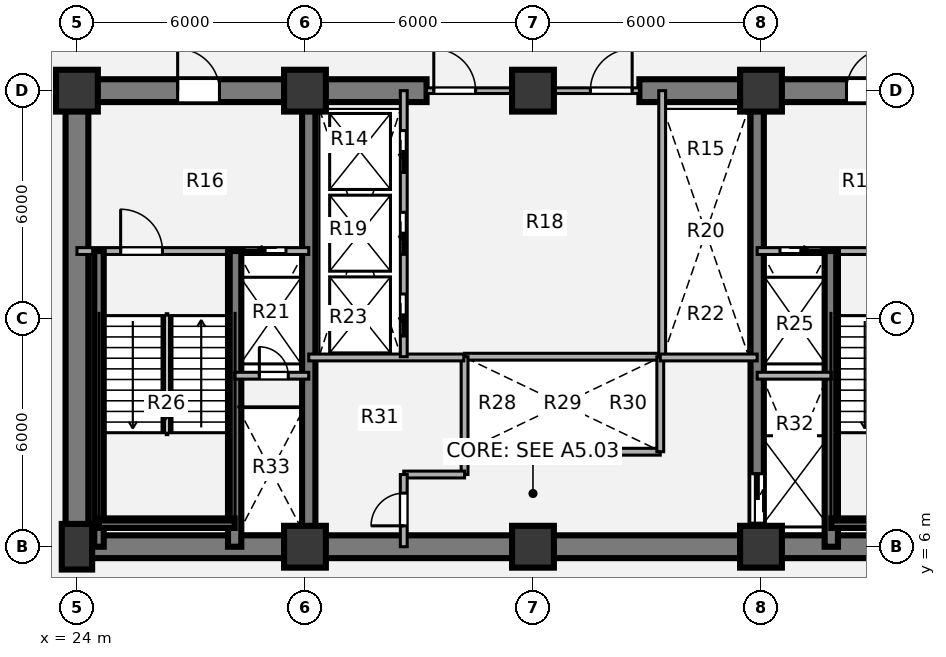
"""IFC4 building model, lengths in metres.
Left out: names, types, materials, properties, quantities, classifications, styles, units other than length and angle.
Written with IfcOpenShell. Run it as: python <this file> out.ifc"""

import sys

from ifc_helpers import new_model, si_unit, direction, frame, frame_2d, origin, origin_2d, place, context, subcontext, project, spatial, rectangle, extrude, source, transform, mapped, element, fill, save


model = new_model("IFC4")
c1 = context("Model", 3, precision=1e-05, world=origin(), true_north=direction((0.0, 1.0)))
c2 = subcontext(c1, "Body", "Model", "MODEL_VIEW")
j1 = project(units=[si_unit("LENGTHUNIT", "METRE"), si_unit("PLANEANGLEUNIT", "RADIAN")], contexts=[c1])
p1 = place(None, origin())
s1 = spatial("IfcSite", under=j1, at=p1, CompositionType="ELEMENT")
p2 = place(p1, origin())
s2 = spatial("IfcBuilding", under=s1, at=p2, CompositionType="ELEMENT")
p3 = place(p2, frame((0.0, 0.0, 5.4)))
s3 = spatial("IfcBuildingStorey", under=s2, at=p3, CompositionType="ELEMENT", Elevation=5.4)
m1 = source(origin(), c2, "Body", "SweptSolid", [
    extrude(rectangle(XDim=0.8, YDim=1.2, at=origin_2d()), origin(), (0.0, 0.0, 1.0), 4.32),
])
p4 = place(p3, frame((24.0, 6.0, 0.0), z_axis=(0.0, 0.0, 1.0), x_axis=(1.0, 0.0, 0.0)))
e1 = element("IfcColumn", 1, at=p4, inside=s3, PredefinedType="COLUMN", context=c2, shape_type="MappedRepresentation", body=[
    mapped(m1, transform((0.0, 0.0, 0.0), x_axis=(1.0, 0.0, 0.0), y_axis=(0.0, 1.0, 0.0), z_axis=(0.0, 0.0, 1.0), scale=1.0)),
])
m2 = source(origin(), c2, "Body", "SweptSolid", [
    extrude(rectangle(XDim=1.1, YDim=1.1, at=origin_2d()), origin(), (0.0, 0.0, 1.0), 4.32),
])
for number, where, z_axis, x_axis in (
    (2, (30.0, 6.0, 0.0), (0.0, 0.0, 1.0), (1.0, 0.0, 0.0)),
    (3, (36.0, 6.0, 0.0), (0.0, 0.0, 1.0), (1.0, 0.0, 0.0)),
    (4, (42.0, 6.0, 0.0), (0.0, 0.0, 1.0), (1.0, 0.0, 0.0)),
    (5, (24.0, 18.0, 0.0), (0.0, 0.0, 1.0), (1.0, 0.0, 0.0)),
    (6, (30.0, 18.0, 0.0), (0.0, 0.0, 1.0), (1.0, 0.0, 0.0)),
    (7, (36.0, 18.0, 0.0), (0.0, 0.0, 1.0), (1.0, 0.0, 0.0)),
    (8, (42.0, 18.0, 0.0), (0.0, 0.0, 1.0), (1.0, 0.0, 0.0)),
):
    element("IfcColumn", number, at=place(p3, frame(where, z_axis=z_axis, x_axis=x_axis)), inside=s3, PredefinedType="COLUMN", context=c2, shape_type="MappedRepresentation", body=[
        mapped(m2, transform((0.0, 0.0, 0.0), x_axis=(1.0, 0.0, 0.0), y_axis=(0.0, 1.0, 0.0), z_axis=(0.0, 0.0, 1.0), scale=1.0)),
    ])
p5 = place(p3, frame((48.3, 6.0, 0.0), z_axis=(0.0, 0.0, 1.0), x_axis=(-1.0, 0.0, 0.0)))
e9 = element("IfcWall", 9, at=p5, inside=s3, PredefinedType="SHEAR", context=c2, shape_type="SweptSolid", body=[
    extrude(rectangle(XDim=24.6, YDim=0.6, at=frame_2d((12.3, 0.0))), origin(), (0.0, 0.0, 1.0), 4.32),
])
p6 = place(p3, frame((24.0, 6.0, 0.0), z_axis=(0.0, 0.0, 1.0), x_axis=(0.0, 1.0, 0.0)))
e10 = element("IfcWall", 10, at=p6, inside=s3, PredefinedType="SHEAR", context=c2, shape_type="SweptSolid", body=[
    extrude(rectangle(XDim=12.0, YDim=0.6, at=frame_2d((6.0, 0.0))), origin(), (0.0, 0.0, 1.0), 4.32),
])
p7 = place(p3, frame((23.7, 18.0, 0.0), z_axis=(0.0, 0.0, 1.0), x_axis=(1.0, 0.0, 0.0)))
e11 = element("IfcWall", 11, at=p7, inside=s3, PredefinedType="SHEAR", context=c2, shape_type="SweptSolid", body=[
    extrude(rectangle(XDim=9.5, YDim=0.6, at=frame_2d((4.75, 0.0))), origin(), (0.0, 0.0, 1.0), 4.32),
])
p8 = place(p7, frame((2.95, 0.0, 0.0)))
e12 = element("IfcOpeningElement", 12, at=p8, cuts=e11, PredefinedType="OPENING", context=c2, shape_type="SweptSolid", body=[
    extrude(rectangle(XDim=1.1, YDim=2.1, at=origin_2d()), frame((0.55, 0.31, 1.05), z_axis=(0.0, -1.0, 0.0), x_axis=(1.0, 0.0, 0.0)), (0.0, 0.0, 1.0), 0.62),
])
p9 = place(p3, frame((38.8, 18.0, 0.0), z_axis=(0.0, 0.0, 1.0), x_axis=(1.0, 0.0, 0.0)))
e13 = element("IfcWall", 13, at=p9, inside=s3, PredefinedType="SHEAR", context=c2, shape_type="SweptSolid", body=[
    extrude(rectangle(XDim=9.5, YDim=0.6, at=frame_2d((4.75, 0.0))), origin(), (0.0, 0.0, 1.0), 4.32),
])
p10 = place(p9, frame((5.45, 0.0, 0.0)))
e14 = element("IfcOpeningElement", 14, at=p10, cuts=e13, PredefinedType="OPENING", context=c2, shape_type="SweptSolid", body=[
    extrude(rectangle(XDim=1.1, YDim=2.1, at=origin_2d()), frame((0.55, 0.31, 1.05), z_axis=(0.0, -1.0, 0.0), x_axis=(1.0, 0.0, 0.0)), (0.0, 0.0, 1.0), 0.62),
])
p11 = place(p3, frame((30.1, 6.0, 0.0), z_axis=(0.0, 0.0, 1.0), x_axis=(0.0, 1.0, 0.0)))
e15 = element("IfcWall", 15, at=p11, inside=s3, PredefinedType="SHEAR", context=c2, shape_type="SweptSolid", body=[
    extrude(rectangle(XDim=12.0, YDim=0.35, at=frame_2d((6.0, 0.0))), origin(), (0.0, 0.0, 1.0), 4.32),
])
p12 = place(p3, frame((41.9, 18.0, 0.0), z_axis=(0.0, 0.0, 1.0), x_axis=(0.0, -1.0, 0.0)))
e16 = element("IfcWall", 16, at=p12, inside=s3, PredefinedType="SHEAR", context=c2, shape_type="SweptSolid", body=[
    extrude(rectangle(XDim=12.0, YDim=0.35, at=frame_2d((6.0, 0.0))), origin(), (0.0, 0.0, 1.0), 4.32),
])
p13 = place(p12, frame((10.08, 0.0, 0.0)))
e17 = element("IfcOpeningElement", 17, at=p13, cuts=e16, PredefinedType="OPENING", context=c2, shape_type="SweptSolid", body=[
    extrude(rectangle(XDim=1.3, YDim=2.1, at=origin_2d()), frame((0.65, 0.185, 1.05), z_axis=(0.0, -1.0, 0.0), x_axis=(1.0, 0.0, 0.0)), (0.0, 0.0, 1.0), 0.37),
])
for number, where, z_axis, x_axis in (
    (18, (34.2, 11.0, 0.0), (0.0, 0.0, 1.0), (1.0, 0.0, 0.0)),
    (19, (34.2, 8.5, 0.0), (0.0, 0.0, 1.0), (1.0, 0.0, 0.0)),
):
    element("IfcWall", number, at=place(p3, frame(where, z_axis=z_axis, x_axis=x_axis)), inside=s3, PredefinedType="PARTITIONING", context=c2, shape_type="SweptSolid", body=[
        extrude(rectangle(XDim=5.15, YDim=0.18, at=frame_2d((2.575, 0.0))), origin(), (0.0, 0.0, 1.0), 4.01),
    ])
for number, where, z_axis, x_axis in (
    (20, (34.2, 8.5, 0.0), (0.0, 0.0, 1.0), (0.0, 1.0, 0.0)),
    (21, (39.35, 8.5, 0.0), (0.0, 0.0, 1.0), (0.0, 1.0, 0.0)),
):
    element("IfcWall", number, at=place(p3, frame(where, z_axis=z_axis, x_axis=x_axis)), inside=s3, PredefinedType="PARTITIONING", context=c2, shape_type="SweptSolid", body=[
        extrude(rectangle(XDim=2.5, YDim=0.18, at=frame_2d((1.25, 0.0))), origin(), (0.0, 0.0, 1.0), 4.01),
    ])
p14 = place(p3, frame((39.4, 11.0, 0.0), z_axis=(0.0, 0.0, 1.0), x_axis=(0.0, 1.0, 0.0)))
e22 = element("IfcWall", 22, at=p14, inside=s3, PredefinedType="PARTITIONING", context=c2, shape_type="SweptSolid", body=[
    extrude(rectangle(XDim=7.0, YDim=0.18, at=frame_2d((3.5, 0.0))), origin(), (0.0, 0.0, 1.0), 4.01),
])
p15 = place(p3, frame((30.1, 10.98, 0.0), z_axis=(0.0, 0.0, 1.0), x_axis=(1.0, 0.0, 0.0)))
e23 = element("IfcWall", 23, at=p15, inside=s3, PredefinedType="PARTITIONING", context=c2, shape_type="SweptSolid", body=[
    extrude(rectangle(XDim=4.08, YDim=0.18, at=frame_2d((2.04, 0.0))), origin(), (0.0, 0.0, 1.0), 4.01),
])
p16 = place(p3, frame((34.2, 7.9, 0.0), z_axis=(0.0, 0.0, 1.0), x_axis=(0.0, 1.0, 0.0)))
e24 = element("IfcWall", 24, at=p16, inside=s3, PredefinedType="PARTITIONING", context=c2, shape_type="SweptSolid", body=[
    extrude(rectangle(XDim=0.6, YDim=0.18, at=frame_2d((0.3, 0.0))), origin(), (0.0, 0.0, 1.0), 4.01),
])
p17 = place(p3, frame((32.6, 7.9, 0.0), z_axis=(0.0, 0.0, 1.0), x_axis=(1.0, 0.0, 0.0)))
e25 = element("IfcWall", 25, at=p17, inside=s3, PredefinedType="PARTITIONING", context=c2, shape_type="SweptSolid", body=[
    extrude(rectangle(XDim=1.6, YDim=0.18, at=frame_2d((0.8, 0.0))), origin(), (0.0, 0.0, 1.0), 4.01),
])
p18 = place(p3, frame((32.6, 6.0, 0.0), z_axis=(0.0, 0.0, 1.0), x_axis=(0.0, 1.0, 0.0)))
e26 = element("IfcWall", 26, at=p18, inside=s3, PredefinedType="PARTITIONING", context=c2, shape_type="SweptSolid", body=[
    extrude(rectangle(XDim=1.9, YDim=0.18, at=frame_2d((0.95, 0.0))), origin(), (0.0, 0.0, 1.0), 4.01),
])
p19 = place(p18, frame((0.55, 0.0, 0.0)))
e27 = element("IfcOpeningElement", 27, at=p19, cuts=e26, PredefinedType="OPENING", context=c2, shape_type="SweptSolid", body=[
    extrude(rectangle(XDim=0.86, YDim=2.1, at=origin_2d()), frame((0.43, 0.1, 1.05), z_axis=(0.0, -1.0, 0.0), x_axis=(1.0, 0.0, 0.0)), (0.0, 0.0, 1.0), 0.2),
])
p20 = place(p3, frame((39.35, 10.98, 0.0), z_axis=(0.0, 0.0, 1.0), x_axis=(1.0, 0.0, 0.0)))
e28 = element("IfcWall", 28, at=p20, inside=s3, PredefinedType="PARTITIONING", context=c2, shape_type="SweptSolid", body=[
    extrude(rectangle(XDim=2.55, YDim=0.18, at=frame_2d((1.275, 0.0))), origin(), (0.0, 0.0, 1.0), 4.01),
])
p21 = place(p3, frame((33.2, 18.0, 0.0), z_axis=(0.0, 0.0, 1.0), x_axis=(1.0, 0.0, 0.0)))
e29 = element("IfcWall", 29, at=p21, inside=s3, PredefinedType="PARTITIONING", context=c2, shape_type="SweptSolid", body=[
    extrude(rectangle(XDim=5.6, YDim=0.15, at=frame_2d((2.8, 0.0))), origin(), (0.0, 0.0, 1.0), 2.825),
])
p22 = place(p21, frame((0.19, 0.0, 0.0)))
e30 = element("IfcOpeningElement", 30, at=p22, cuts=e29, PredefinedType="OPENING", context=c2, shape_type="SweptSolid", body=[
    extrude(rectangle(XDim=1.1, YDim=2.1, at=origin_2d()), frame((0.55, 0.085, 1.05), z_axis=(0.0, -1.0, 0.0), x_axis=(1.0, 0.0, 0.0)), (0.0, 0.0, 1.0), 0.17),
])
p23 = place(p21, frame((4.31, 0.0, 0.0)))
e31 = element("IfcOpeningElement", 31, at=p23, cuts=e29, PredefinedType="OPENING", context=c2, shape_type="SweptSolid", body=[
    extrude(rectangle(XDim=1.1, YDim=2.1, at=origin_2d()), frame((0.55, 0.085, 1.05), z_axis=(0.0, -1.0, 0.0), x_axis=(1.0, 0.0, 0.0)), (0.0, 0.0, 1.0), 0.17),
])
p24 = place(p3, frame((24.0, 13.78, 0.0), z_axis=(0.0, 0.0, 1.0), x_axis=(1.0, 0.0, 0.0)))
e32 = element("IfcWall", 32, at=p24, inside=s3, PredefinedType="PARTITIONING", context=c2, shape_type="SweptSolid", body=[
    extrude(rectangle(XDim=6.1, YDim=0.18, at=frame_2d((3.05, 0.0))), origin(), (0.0, 0.0, 1.0), 4.01),
])
p25 = place(p24, frame((1.15, 0.0, 0.0)))
e33 = element("IfcOpeningElement", 33, at=p25, cuts=e32, PredefinedType="OPENING", context=c2, shape_type="SweptSolid", body=[
    extrude(rectangle(XDim=1.1, YDim=2.1, at=origin_2d()), frame((0.55, 0.1, 1.05), z_axis=(0.0, -1.0, 0.0), x_axis=(1.0, 0.0, 0.0)), (0.0, 0.0, 1.0), 0.2),
])
p26 = place(p24, frame((4.4, 0.0, 0.0)))
e34 = element("IfcOpeningElement", 34, at=p26, cuts=e32, PredefinedType="OPENING", context=c2, shape_type="SweptSolid", body=[
    extrude(rectangle(XDim=1.1, YDim=2.1, at=origin_2d()), frame((0.55, 0.1, 1.05), z_axis=(0.0, -1.0, 0.0), x_axis=(1.0, 0.0, 0.0)), (0.0, 0.0, 1.0), 0.2),
])
p27 = place(p3, frame((28.15, 6.0, 0.0), z_axis=(0.0, 0.0, 1.0), x_axis=(0.0, 1.0, 0.0)))
e35 = element("IfcWall", 35, at=p27, inside=s3, PredefinedType="SHEAR", context=c2, shape_type="SweptSolid", body=[
    extrude(rectangle(XDim=7.78, YDim=0.35, at=frame_2d((3.89, 0.0))), origin(), (0.0, 0.0, 1.0), 4.36),
])
p28 = place(p3, frame((24.58, 6.0, 0.0), z_axis=(0.0, 0.0, 1.0), x_axis=(0.0, 1.0, 0.0)))
e36 = element("IfcWall", 36, at=p28, inside=s3, PredefinedType="SHEAR", context=c2, shape_type="SweptSolid", body=[
    extrude(rectangle(XDim=7.78, YDim=0.25, at=frame_2d((3.89, 0.0))), origin(), (0.0, 0.0, 1.0), 4.36),
])
p29 = place(p3, frame((24.58, 6.62, 0.0), z_axis=(0.0, 0.0, 1.0), x_axis=(1.0, 0.0, 0.0)))
e37 = element("IfcWall", 37, at=p29, inside=s3, PredefinedType="SHEAR", context=c2, shape_type="SweptSolid", body=[
    extrude(rectangle(XDim=3.57, YDim=0.25, at=frame_2d((1.785, 0.0))), origin(), (0.0, 0.0, 1.0), 4.36),
])
p30 = place(p3, frame((28.15, 10.5, 0.0), z_axis=(0.0, 0.0, 1.0), x_axis=(1.0, 0.0, 0.0)))
e38 = element("IfcWall", 38, at=p30, inside=s3, PredefinedType="PARTITIONING", context=c2, shape_type="SweptSolid", body=[
    extrude(rectangle(XDim=1.95, YDim=0.18, at=frame_2d((0.975, 0.0))), origin(), (0.0, 0.0, 1.0), 4.01),
])
p31 = place(p30, frame((0.65, 0.0, 0.0)))
e39 = element("IfcOpeningElement", 39, at=p31, cuts=e38, PredefinedType="OPENING", context=c2, shape_type="SweptSolid", body=[
    extrude(rectangle(XDim=0.76, YDim=2.05, at=origin_2d()), frame((0.38, 0.1, 1.025), z_axis=(0.0, -1.0, 0.0), x_axis=(1.0, 0.0, 0.0)), (0.0, 0.0, 1.0), 0.2),
])
p32 = place(p3, frame((41.9, 13.78, 0.0), z_axis=(0.0, 0.0, 1.0), x_axis=(1.0, 0.0, 0.0)))
e40 = element("IfcWall", 40, at=p32, inside=s3, PredefinedType="PARTITIONING", context=c2, shape_type="SweptSolid", body=[
    extrude(rectangle(XDim=6.1, YDim=0.18, at=frame_2d((3.05, 0.0))), origin(), (0.0, 0.0, 1.0), 4.01),
])
p33 = place(p32, frame((0.6, 0.0, 0.0)))
e41 = element("IfcOpeningElement", 41, at=p33, cuts=e40, PredefinedType="OPENING", context=c2, shape_type="SweptSolid", body=[
    extrude(rectangle(XDim=1.1, YDim=2.1, at=origin_2d()), frame((0.55, 0.1, 1.05), z_axis=(0.0, -1.0, 0.0), x_axis=(1.0, 0.0, 0.0)), (0.0, 0.0, 1.0), 0.2),
])
p34 = place(p32, frame((3.8, 0.0, 0.0)))
e42 = element("IfcOpeningElement", 42, at=p34, cuts=e40, PredefinedType="OPENING", context=c2, shape_type="SweptSolid", body=[
    extrude(rectangle(XDim=1.1, YDim=2.1, at=origin_2d()), frame((0.55, 0.1, 1.05), z_axis=(0.0, -1.0, 0.0), x_axis=(1.0, 0.0, 0.0)), (0.0, 0.0, 1.0), 0.2),
])
p35 = place(p3, frame((43.85, 6.0, 0.0), z_axis=(0.0, 0.0, 1.0), x_axis=(0.0, 1.0, 0.0)))
e43 = element("IfcWall", 43, at=p35, inside=s3, PredefinedType="SHEAR", context=c2, shape_type="SweptSolid", body=[
    extrude(rectangle(XDim=7.78, YDim=0.35, at=frame_2d((3.89, 0.0))), origin(), (0.0, 0.0, 1.0), 4.36),
])
p36 = place(p3, frame((43.85, 6.62, 0.0), z_axis=(0.0, 0.0, 1.0), x_axis=(1.0, 0.0, 0.0)))
e44 = element("IfcWall", 44, at=p36, inside=s3, PredefinedType="SHEAR", context=c2, shape_type="SweptSolid", body=[
    extrude(rectangle(XDim=3.57, YDim=0.25, at=frame_2d((1.785, 0.0))), origin(), (0.0, 0.0, 1.0), 4.36),
])
p37 = place(p3, frame((41.9, 10.5, 0.0), z_axis=(0.0, 0.0, 1.0), x_axis=(1.0, 0.0, 0.0)))
e45 = element("IfcWall", 45, at=p37, inside=s3, PredefinedType="PARTITIONING", context=c2, shape_type="SweptSolid", body=[
    extrude(rectangle(XDim=1.95, YDim=0.18, at=frame_2d((0.975, 0.0))), origin(), (0.0, 0.0, 1.0), 4.01),
])
p38 = place(p3, frame((32.6, 11.0, 0.0), z_axis=(0.0, 0.0, 1.0), x_axis=(0.0, 1.0, 0.0)))
e46 = element("IfcWall", 46, at=p38, inside=s3, PredefinedType="PARTITIONING", context=c2, shape_type="SweptSolid", body=[
    extrude(rectangle(XDim=7.0, YDim=0.18, at=frame_2d((3.5, 0.0))), origin(), (0.0, 0.0, 1.0), 4.01),
])
p39 = place(p38, frame((0.55, 0.0, 0.0)))
e47 = element("IfcOpeningElement", 47, at=p39, cuts=e46, PredefinedType="OPENING", context=c2, shape_type="SweptSolid", body=[
    extrude(rectangle(XDim=1.1, YDim=2.1, at=origin_2d()), frame((0.55, 0.1, 1.05), z_axis=(0.0, -1.0, 0.0), x_axis=(1.0, 0.0, 0.0)), (0.0, 0.0, 1.0), 0.2),
])
p40 = place(p38, frame((2.7, 0.0, 0.0)))
e48 = element("IfcOpeningElement", 48, at=p40, cuts=e46, PredefinedType="OPENING", context=c2, shape_type="SweptSolid", body=[
    extrude(rectangle(XDim=1.1, YDim=2.1, at=origin_2d()), frame((0.55, 0.1, 1.05), z_axis=(0.0, -1.0, 0.0), x_axis=(1.0, 0.0, 0.0)), (0.0, 0.0, 1.0), 0.2),
])
p41 = place(p38, frame((4.85, 0.0, 0.0)))
e49 = element("IfcOpeningElement", 49, at=p41, cuts=e46, PredefinedType="OPENING", context=c2, shape_type="SweptSolid", body=[
    extrude(rectangle(XDim=1.1, YDim=2.1, at=origin_2d()), frame((0.55, 0.1, 1.05), z_axis=(0.0, -1.0, 0.0), x_axis=(1.0, 0.0, 0.0)), (0.0, 0.0, 1.0), 0.2),
])
m3 = source(origin(), c2, "Body", "SweptSolid", [
    extrude(rectangle(XDim=0.86, YDim=2.1, at=origin_2d()), frame((0.43, 0.025, 1.05), z_axis=(0.0, -1.0, 0.0), x_axis=(1.0, 0.0, 0.0)), (0.0, 0.0, 1.0), 0.05),
])
p42 = place(p19, origin())
e50 = element("IfcDoor", 50, at=p42, inside=s3, OperationType="SINGLE_SWING_LEFT", PredefinedType="DOOR", context=c2, shape_type="MappedRepresentation", body=[
    mapped(m3, transform((0.0, 0.0, 0.0), x_axis=(1.0, 0.0, 0.0), y_axis=(0.0, 1.0, 0.0), z_axis=(0.0, 0.0, 1.0), scale=1.0)),
])
fill(e27, e50)
m4 = source(origin(), c2, "Body", "SweptSolid", [
    extrude(rectangle(XDim=1.1, YDim=2.1, at=origin_2d()), frame((0.55, 0.025, 1.05), z_axis=(0.0, -1.0, 0.0), x_axis=(1.0, 0.0, 0.0)), (0.0, 0.0, 1.0), 0.05),
])
p43 = place(p22, origin())
e51 = element("IfcDoor", 51, at=p43, inside=s3, OperationType="SINGLE_SWING_LEFT", PredefinedType="DOOR", context=c2, shape_type="MappedRepresentation", body=[
    mapped(m4, transform((0.0, 0.0, 0.0), x_axis=(1.0, 0.0, 0.0), y_axis=(0.0, 1.0, 0.0), z_axis=(0.0, 0.0, 1.0), scale=1.0)),
])
fill(e30, e51)
p44 = place(p23, origin())
e52 = element("IfcDoor", 52, at=p44, inside=s3, OperationType="SINGLE_SWING_RIGHT", PredefinedType="DOOR", context=c2, shape_type="MappedRepresentation", body=[
    mapped(m4, transform((0.0, 0.0, 0.0), x_axis=(1.0, 0.0, 0.0), y_axis=(0.0, 1.0, 0.0), z_axis=(0.0, 0.0, 1.0), scale=1.0)),
])
fill(e31, e52)
m5 = source(origin(), c2, "Body", "SweptSolid", [
    extrude(rectangle(XDim=1.1, YDim=2.1, at=origin_2d()), frame((0.55, 0.025, 1.05), z_axis=(0.0, -1.0, 0.0), x_axis=(1.0, 0.0, 0.0)), (0.0, 0.0, 1.0), 0.05),
])
p45 = place(p25, origin())
e53 = element("IfcDoor", 53, at=p45, inside=s3, OperationType="SINGLE_SWING_LEFT", PredefinedType="DOOR", context=c2, shape_type="MappedRepresentation", body=[
    mapped(m5, transform((0.0, 0.0, 0.0), x_axis=(1.0, 0.0, 0.0), y_axis=(0.0, 1.0, 0.0), z_axis=(0.0, 0.0, 1.0), scale=1.0)),
])
fill(e33, e53)
m6 = source(origin(), c2, "Body", "SweptSolid", [
    extrude(rectangle(XDim=1.1, YDim=2.1, at=origin_2d()), frame((0.55, 0.025, 1.05), z_axis=(0.0, -1.0, 0.0), x_axis=(1.0, 0.0, 0.0)), (0.0, 0.0, 1.0), 0.05),
])
p46 = place(p26, origin())
e54 = element("IfcDoor", 54, at=p46, inside=s3, OperationType="SLIDING_TO_LEFT", PredefinedType="DOOR", context=c2, shape_type="MappedRepresentation", body=[
    mapped(m6, transform((0.0, 0.0, 0.0), x_axis=(1.0, 0.0, 0.0), y_axis=(0.0, 1.0, 0.0), z_axis=(0.0, 0.0, 1.0), scale=1.0)),
])
fill(e34, e54)
m7 = source(origin(), c2, "Body", "SweptSolid", [
    extrude(rectangle(XDim=0.76, YDim=2.05, at=origin_2d()), frame((0.38, 0.025, 1.025), z_axis=(0.0, -1.0, 0.0), x_axis=(1.0, 0.0, 0.0)), (0.0, 0.0, 1.0), 0.05),
])
p47 = place(p31, origin())
e55 = element("IfcDoor", 55, at=p47, inside=s3, OperationType="SINGLE_SWING_LEFT", PredefinedType="DOOR", context=c2, shape_type="MappedRepresentation", body=[
    mapped(m7, transform((0.0, 0.0, 0.0), x_axis=(1.0, 0.0, 0.0), y_axis=(0.0, 1.0, 0.0), z_axis=(0.0, 0.0, 1.0), scale=1.0)),
])
fill(e39, e55)
p48 = place(p33, origin())
e56 = element("IfcDoor", 56, at=p48, inside=s3, OperationType="SLIDING_TO_RIGHT", PredefinedType="DOOR", context=c2, shape_type="MappedRepresentation", body=[
    mapped(m6, transform((0.0, 0.0, 0.0), x_axis=(1.0, 0.0, 0.0), y_axis=(0.0, 1.0, 0.0), z_axis=(0.0, 0.0, 1.0), scale=1.0)),
])
fill(e41, e56)
m8 = source(origin(), c2, "Body", "SweptSolid", [
    extrude(rectangle(XDim=1.3, YDim=2.1, at=origin_2d()), frame((0.65, 0.025, 1.05), z_axis=(0.0, -1.0, 0.0), x_axis=(1.0, 0.0, 0.0)), (0.0, 0.0, 1.0), 0.05),
])
p49 = place(p13, origin())
e57 = element("IfcDoor", 57, at=p49, inside=s3, OperationType="SLIDING_TO_LEFT", PredefinedType="DOOR", context=c2, shape_type="MappedRepresentation", body=[
    mapped(m8, transform((0.0, 0.0, 0.0), x_axis=(1.0, 0.0, 0.0), y_axis=(0.0, 1.0, 0.0), z_axis=(0.0, 0.0, 1.0), scale=1.0)),
])
fill(e17, e57)
p50 = place(p8, origin())
e58 = element("IfcDoor", 58, at=p50, inside=s3, OperationType="SINGLE_SWING_LEFT", PredefinedType="DOOR", context=c2, shape_type="MappedRepresentation", body=[
    mapped(m4, transform((0.0, 0.0, 0.0), x_axis=(1.0, 0.0, 0.0), y_axis=(0.0, 1.0, 0.0), z_axis=(0.0, 0.0, 1.0), scale=1.0)),
])
fill(e12, e58)
p51 = place(p10, origin())
e59 = element("IfcDoor", 59, at=p51, inside=s3, OperationType="SINGLE_SWING_RIGHT", PredefinedType="DOOR", context=c2, shape_type="MappedRepresentation", body=[
    mapped(m4, transform((0.0, 0.0, 0.0), x_axis=(1.0, 0.0, 0.0), y_axis=(0.0, 1.0, 0.0), z_axis=(0.0, 0.0, 1.0), scale=1.0)),
])
fill(e14, e59)
p52 = place(p39, origin())
e60 = element("IfcDoor", 60, at=p52, inside=s3, OperationType="SLIDING_TO_LEFT", PredefinedType="DOOR", context=c2, shape_type="MappedRepresentation", body=[
    mapped(m6, transform((0.0, 0.0, 0.0), x_axis=(1.0, 0.0, 0.0), y_axis=(0.0, 1.0, 0.0), z_axis=(0.0, 0.0, 1.0), scale=1.0)),
])
fill(e47, e60)
p53 = place(p40, origin())
e61 = element("IfcDoor", 61, at=p53, inside=s3, OperationType="SLIDING_TO_LEFT", PredefinedType="DOOR", context=c2, shape_type="MappedRepresentation", body=[
    mapped(m6, transform((0.0, 0.0, 0.0), x_axis=(1.0, 0.0, 0.0), y_axis=(0.0, 1.0, 0.0), z_axis=(0.0, 0.0, 1.0), scale=1.0)),
])
fill(e48, e61)
p54 = place(p41, origin())
e62 = element("IfcDoor", 62, at=p54, inside=s3, OperationType="SLIDING_TO_LEFT", PredefinedType="DOOR", context=c2, shape_type="MappedRepresentation", body=[
    mapped(m6, transform((0.0, 0.0, 0.0), x_axis=(1.0, 0.0, 0.0), y_axis=(0.0, 1.0, 0.0), z_axis=(0.0, 0.0, 1.0), scale=1.0)),
])
fill(e49, e62)
save(model, sys.argv[1])
